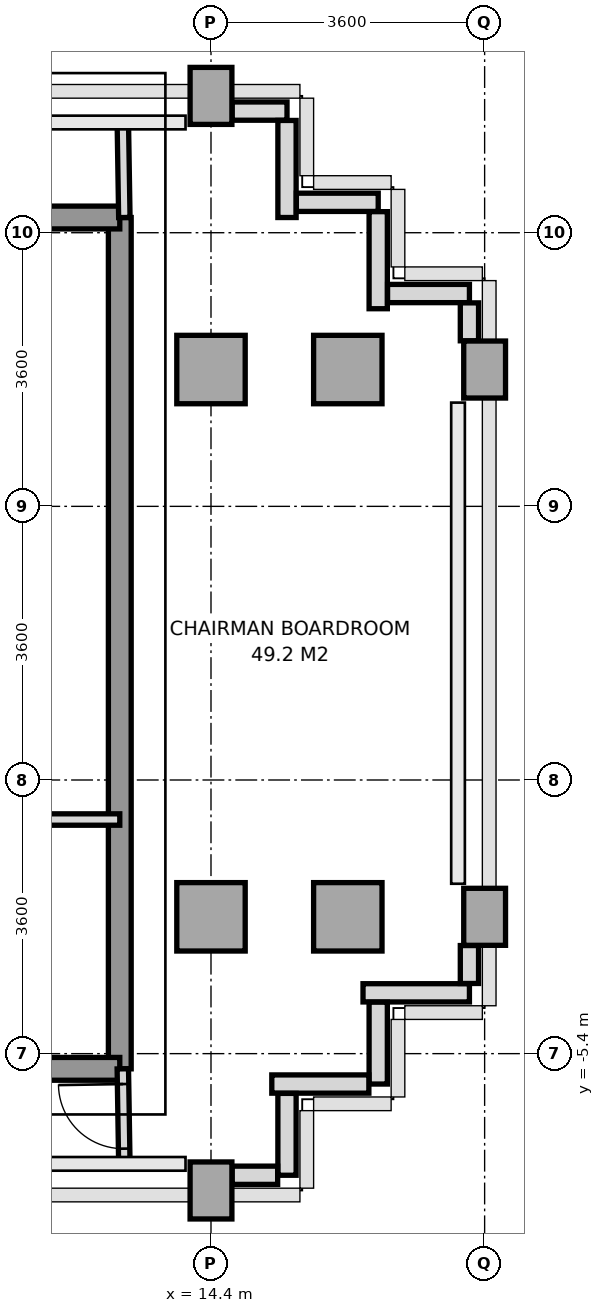
"""IFC4 building model, lengths in metres.
Left out: names, types, materials, properties, quantities, classifications, styles, units other than length and angle.
Written with IfcOpenShell. Run it as: python <this file> out.ifc"""

import sys

from ifc_helpers import new_model, si_unit, direction, frame, frame_2d, origin, origin_2d, place, context, subcontext, project, spatial, rectangle, extrude, source, transform, mapped, element, fill, save


model = new_model("IFC4")
c1 = context("Model", 3, precision=1e-05, world=origin(), true_north=direction((0.0, 1.0)))
c2 = subcontext(c1, "Body", "Model", "MODEL_VIEW")
j1 = project(units=[si_unit("LENGTHUNIT", "METRE"), si_unit("PLANEANGLEUNIT", "RADIAN")], contexts=[c1])
p1 = place(None, origin())
s1 = spatial("IfcSite", under=j1, at=p1, CompositionType="ELEMENT")
p2 = place(p1, origin())
s2 = spatial("IfcBuilding", under=s1, at=p2, CompositionType="ELEMENT")
p3 = place(p2, frame((0.0, 0.0, 230.0)))
s3 = spatial("IfcBuildingStorey", under=s2, at=p3, CompositionType="ELEMENT", Elevation=230.0)
m1 = source(origin(), c2, "Body", "SweptSolid", [
    extrude(rectangle(XDim=0.55, YDim=0.75, at=origin_2d()), origin(), (0.0, 0.0, 1.0), 3.01),
])
p4 = place(p3, frame((14.4, -7.2, 0.0), z_axis=(0.0, 0.0, 1.0), x_axis=(1.0, 0.0, 0.0)))
e1 = element("IfcColumn", 1, at=p4, inside=s3, PredefinedType="COLUMN", context=c2, shape_type="MappedRepresentation", body=[
    mapped(m1, transform((0.0, 0.0, 0.0), x_axis=(1.0, 0.0, 0.0), y_axis=(0.0, 1.0, 0.0), z_axis=(0.0, 0.0, 1.0), scale=1.0)),
])
m2 = source(origin(), c2, "Body", "SweptSolid", [
    extrude(rectangle(XDim=0.9, YDim=0.9, at=origin_2d()), origin(), (0.0, 0.0, 1.0), 3.01),
])
for number, where, z_axis, x_axis in (
    (2, (14.4, -3.6, 0.0), (0.0, 0.0, 1.0), (1.0, 0.0, 0.0)),
    (3, (14.4, 3.6, 0.0), (0.0, 0.0, 1.0), (1.0, 0.0, 0.0)),
):
    element("IfcColumn", number, at=place(p3, frame(where, z_axis=z_axis, x_axis=x_axis)), inside=s3, PredefinedType="COLUMN", context=c2, shape_type="MappedRepresentation", body=[
        mapped(m2, transform((0.0, 0.0, 0.0), x_axis=(1.0, 0.0, 0.0), y_axis=(0.0, 1.0, 0.0), z_axis=(0.0, 0.0, 1.0), scale=1.0)),
    ])
p5 = place(p3, frame((14.4, 7.2, 0.0), z_axis=(0.0, 0.0, 1.0), x_axis=(1.0, 0.0, 0.0)))
e4 = element("IfcColumn", 4, at=p5, inside=s3, PredefinedType="COLUMN", context=c2, shape_type="MappedRepresentation", body=[
    mapped(m1, transform((0.0, 0.0, 0.0), x_axis=(1.0, 0.0, 0.0), y_axis=(0.0, 1.0, 0.0), z_axis=(0.0, 0.0, 1.0), scale=1.0)),
])
for number, where, z_axis, x_axis in (
    (5, (16.2, -3.6, 0.0), (0.0, 0.0, 1.0), (1.0, 0.0, 0.0)),
    (6, (16.2, 3.6, 0.0), (0.0, 0.0, 1.0), (1.0, 0.0, 0.0)),
):
    element("IfcColumn", number, at=place(p3, frame(where, z_axis=z_axis, x_axis=x_axis)), inside=s3, PredefinedType="COLUMN", context=c2, shape_type="MappedRepresentation", body=[
        mapped(m2, transform((0.0, 0.0, 0.0), x_axis=(1.0, 0.0, 0.0), y_axis=(0.0, 1.0, 0.0), z_axis=(0.0, 0.0, 1.0), scale=1.0)),
    ])
for number, where, z_axis, x_axis in (
    (7, (18.0, -3.6, 0.0), (0.0, 0.0, 1.0), (1.0, 0.0, 0.0)),
    (8, (18.0, 3.6, 0.0), (0.0, 0.0, 1.0), (1.0, 0.0, 0.0)),
):
    element("IfcColumn", number, at=place(p3, frame(where, z_axis=z_axis, x_axis=x_axis)), inside=s3, PredefinedType="COLUMN", context=c2, shape_type="MappedRepresentation", body=[
        mapped(m1, transform((0.0, 0.0, 0.0), x_axis=(1.0, 0.0, 0.0), y_axis=(0.0, 1.0, 0.0), z_axis=(0.0, 0.0, 1.0), scale=1.0)),
    ])
p6 = place(p3, frame((17.8, -4.6, 0.0), z_axis=(0.0, 0.0, 1.0), x_axis=(-1.0, 0.0, 0.0)))
e9 = element("IfcWall", 9, at=p6, inside=s3, PredefinedType="PARAPET", context=c2, shape_type="SweptSolid", body=[
    extrude(rectangle(XDim=1.4, YDim=0.24, at=frame_2d((0.7, 0.0))), origin(), (0.0, 0.0, 1.0), 1.15),
])
p7 = place(p3, frame((16.6, -4.723, 0.0), z_axis=(0.0, 0.0, 1.0), x_axis=(0.0, -1.0, 0.0)))
e10 = element("IfcWall", 10, at=p7, inside=s3, PredefinedType="PARAPET", context=c2, shape_type="SweptSolid", body=[
    extrude(rectangle(XDim=1.077, YDim=0.24, at=frame_2d((0.539, 0.0))), origin(), (0.0, 0.0, 1.0), 1.15),
])
p8 = place(p3, frame((16.477, -5.8, 0.0), z_axis=(0.0, 0.0, 1.0), x_axis=(-1.0, 0.0, 0.0)))
e11 = element("IfcWall", 11, at=p8, inside=s3, PredefinedType="PARAPET", context=c2, shape_type="SweptSolid", body=[
    extrude(rectangle(XDim=1.277, YDim=0.24, at=frame_2d((0.639, 0.0))), origin(), (0.0, 0.0, 1.0), 1.15),
])
p9 = place(p3, frame((15.4, -5.923, 0.0), z_axis=(0.0, 0.0, 1.0), x_axis=(0.0, -1.0, 0.0)))
e12 = element("IfcWall", 12, at=p9, inside=s3, PredefinedType="PARAPET", context=c2, shape_type="SweptSolid", body=[
    extrude(rectangle(XDim=1.077, YDim=0.24, at=frame_2d((0.539, 0.0))), origin(), (0.0, 0.0, 1.0), 1.15),
])
p10 = place(p3, frame((15.277, -7.0, 0.0), z_axis=(0.0, 0.0, 1.0), x_axis=(-1.0, 0.0, 0.0)))
e13 = element("IfcWall", 13, at=p10, inside=s3, PredefinedType="PARAPET", context=c2, shape_type="SweptSolid", body=[
    extrude(rectangle(XDim=0.599, YDim=0.24, at=frame_2d((0.3, 0.0))), origin(), (0.0, 0.0, 1.0), 1.15),
])
p11 = place(p3, frame((14.678, 7.0, 0.0), z_axis=(0.0, 0.0, 1.0), x_axis=(1.0, 0.0, 0.0)))
e14 = element("IfcWall", 14, at=p11, inside=s3, PredefinedType="PARAPET", context=c2, shape_type="SweptSolid", body=[
    extrude(rectangle(XDim=0.722, YDim=0.24, at=frame_2d((0.361, 0.0))), origin(), (0.0, 0.0, 1.0), 1.15),
])
p12 = place(p3, frame((15.4, 6.877, 0.0), z_axis=(0.0, 0.0, 1.0), x_axis=(0.0, -1.0, 0.0)))
e15 = element("IfcWall", 15, at=p12, inside=s3, PredefinedType="PARAPET", context=c2, shape_type="SweptSolid", body=[
    extrude(rectangle(XDim=1.277, YDim=0.24, at=frame_2d((0.638, 0.0))), origin(), (0.0, 0.0, 1.0), 1.15),
])
p13 = place(p3, frame((15.523, 5.8, 0.0), z_axis=(0.0, 0.0, 1.0), x_axis=(1.0, 0.0, 0.0)))
e16 = element("IfcWall", 16, at=p13, inside=s3, PredefinedType="PARAPET", context=c2, shape_type="SweptSolid", body=[
    extrude(rectangle(XDim=1.077, YDim=0.24, at=frame_2d((0.539, 0.0))), origin(), (0.0, 0.0, 1.0), 1.15),
])
p14 = place(p3, frame((16.6, 5.677, 0.0), z_axis=(0.0, 0.0, 1.0), x_axis=(0.0, -1.0, 0.0)))
e17 = element("IfcWall", 17, at=p14, inside=s3, PredefinedType="PARAPET", context=c2, shape_type="SweptSolid", body=[
    extrude(rectangle(XDim=1.277, YDim=0.24, at=frame_2d((0.639, 0.0))), origin(), (0.0, 0.0, 1.0), 1.15),
])
p15 = place(p3, frame((16.723, 4.6, 0.0), z_axis=(0.0, 0.0, 1.0), x_axis=(1.0, 0.0, 0.0)))
e18 = element("IfcWall", 18, at=p15, inside=s3, PredefinedType="PARAPET", context=c2, shape_type="SweptSolid", body=[
    extrude(rectangle(XDim=1.077, YDim=0.24, at=frame_2d((0.539, 0.0))), origin(), (0.0, 0.0, 1.0), 1.15),
])
for number, where, z_axis, x_axis in (
    (19, (17.8, 4.477, 0.0), (0.0, 0.0, 1.0), (0.0, -1.0, 0.0)),
    (20, (17.8, -3.978, 0.0), (0.0, 0.0, 1.0), (0.0, -1.0, 0.0)),
):
    element("IfcWall", number, at=place(p3, frame(where, z_axis=z_axis, x_axis=x_axis)), inside=s3, PredefinedType="PARAPET", context=c2, shape_type="SweptSolid", body=[
        extrude(rectangle(XDim=0.499, YDim=0.24, at=frame_2d((0.25, 0.0))), origin(), (0.0, 0.0, 1.0), 1.15),
    ])
p16 = place(p3, frame((13.2, -5.6, 0.0), z_axis=(0.0, 0.0, 1.0), x_axis=(0.0, 1.0, 0.0)))
e21 = element("IfcWall", 21, at=p16, inside=s3, PredefinedType="SHEAR", context=c2, shape_type="SweptSolid", body=[
    extrude(rectangle(XDim=11.2, YDim=0.3, at=frame_2d((5.6, 0.0))), origin(), (0.0, 0.0, 1.0), 3.01),
])
p17 = place(p3, frame((11.356, 5.6, 0.0), z_axis=(0.0, 0.0, 1.0), x_axis=(1.0, 0.0, 0.0)))
e22 = element("IfcWall", 22, at=p17, inside=s3, PredefinedType="SHEAR", context=c2, shape_type="SweptSolid", body=[
    extrude(rectangle(XDim=1.844, YDim=0.3, at=frame_2d((0.922, 0.0))), origin(), (0.0, 0.0, 1.0), 3.01),
])
p18 = place(p3, frame((5.4, -5.6, 0.0), z_axis=(0.0, 0.0, 1.0), x_axis=(1.0, 0.0, 0.0)))
e23 = element("IfcWall", 23, at=p18, inside=s3, PredefinedType="SHEAR", context=c2, shape_type="SweptSolid", body=[
    extrude(rectangle(XDim=7.8, YDim=0.3, at=frame_2d((3.9, 0.0))), origin(), (0.0, 0.0, 1.0), 3.01),
])
p19 = place(p18, frame((5.85, 0.0, 0.0)))
e24 = element("IfcOpeningElement", 24, at=p19, cuts=e23, PredefinedType="OPENING", context=c2, shape_type="SweptSolid", body=[
    extrude(rectangle(XDim=0.8, YDim=2.1, at=frame_2d((0.4, 1.05))), frame((0.0, 0.16, 0.0), z_axis=(0.0, -1.0, 0.0), x_axis=(1.0, 0.0, 0.0)), (0.0, 0.0, 1.0), 0.32),
])
p20 = place(p18, frame((1.2, 0.0, 0.0)))
e25 = element("IfcOpeningElement", 25, at=p20, cuts=e23, PredefinedType="OPENING", context=c2, shape_type="SweptSolid", body=[
    extrude(rectangle(XDim=0.85, YDim=2.1, at=frame_2d((0.425, 1.05))), frame((0.0, 0.16, 0.0), z_axis=(0.0, -1.0, 0.0), x_axis=(1.0, 0.0, 0.0)), (0.0, 0.0, 1.0), 0.32),
])
p21 = place(p18, frame((3.4, 0.0, 0.0)))
e26 = element("IfcOpeningElement", 26, at=p21, cuts=e23, PredefinedType="OPENING", context=c2, shape_type="SweptSolid", body=[
    extrude(rectangle(XDim=0.85, YDim=2.1, at=frame_2d((0.425, 1.05))), frame((0.0, 0.16, 0.0), z_axis=(0.0, -1.0, 0.0), x_axis=(1.0, 0.0, 0.0)), (0.0, 0.0, 1.0), 0.32),
])
p22 = place(p3, frame((11.02, -2.32, 0.0), z_axis=(0.0, 0.0, 1.0), x_axis=(1.0, 0.0, 0.0)))
e27 = element("IfcWall", 27, at=p22, inside=s3, PredefinedType="PARTITIONING", context=c2, shape_type="SweptSolid", body=[
    extrude(rectangle(XDim=2.18, YDim=0.15, at=frame_2d((1.09, 0.0))), origin(), (0.0, 0.0, 1.0), 3.01),
])
p23 = place(p3, frame((13.26, 5.6, 0.0), z_axis=(0.0, 0.0, 1.0), x_axis=(-0.016013571389, 0.999871774545, 0.0)))
e28 = element("IfcWall", 28, at=p23, inside=s3, PredefinedType="PARTITIONING", context=c2, shape_type="SweptSolid", body=[
    extrude(rectangle(XDim=1.25, YDim=0.15, at=frame_2d((0.625, 0.0))), origin(), (0.0, 0.0, 1.0), 3.01),
])
p24 = place(p3, frame((13.26, -6.85, 0.0), z_axis=(0.0, 0.0, 1.0), x_axis=(-0.016013571389, 0.999871774545, 0.0)))
e29 = element("IfcWall", 29, at=p24, inside=s3, PredefinedType="PARTITIONING", context=c2, shape_type="SweptSolid", body=[
    extrude(rectangle(XDim=1.25, YDim=0.15, at=frame_2d((0.625, 0.0))), origin(), (0.0, 0.0, 1.0), 3.01),
])
p25 = place(p24, frame((0.2, 0.0, 0.0)))
e30 = element("IfcOpeningElement", 30, at=p25, cuts=e29, PredefinedType="OPENING", context=c2, shape_type="SweptSolid", body=[
    extrude(rectangle(XDim=0.85, YDim=2.1, at=frame_2d((0.425, 1.05))), frame((0.0, 0.085, 0.0), z_axis=(0.0, -1.0, 0.0), x_axis=(1.0, 0.0, 0.0)), (0.0, 0.0, 1.0), 0.17),
])
m3 = source(origin(), c2, "Body", "SweptSolid", [
    extrude(rectangle(XDim=0.85, YDim=2.1, at=frame_2d((0.425, 1.05))), frame((0.0, 0.025, 0.0), z_axis=(0.0, -1.0, 0.0), x_axis=(1.0, 0.0, 0.0)), (0.0, 0.0, 1.0), 0.05),
])
p26 = place(p25, origin())
e31 = element("IfcDoor", 31, at=p26, inside=s3, OperationType="SINGLE_SWING_RIGHT", PredefinedType="DOOR", context=c2, shape_type="MappedRepresentation", body=[
    mapped(m3, transform((0.0, 0.0, 0.0), x_axis=(1.0, 0.0, 0.0), y_axis=(0.0, 1.0, 0.0), z_axis=(0.0, 0.0, 1.0), scale=1.0)),
])
fill(e30, e31)
save(model, sys.argv[1])
